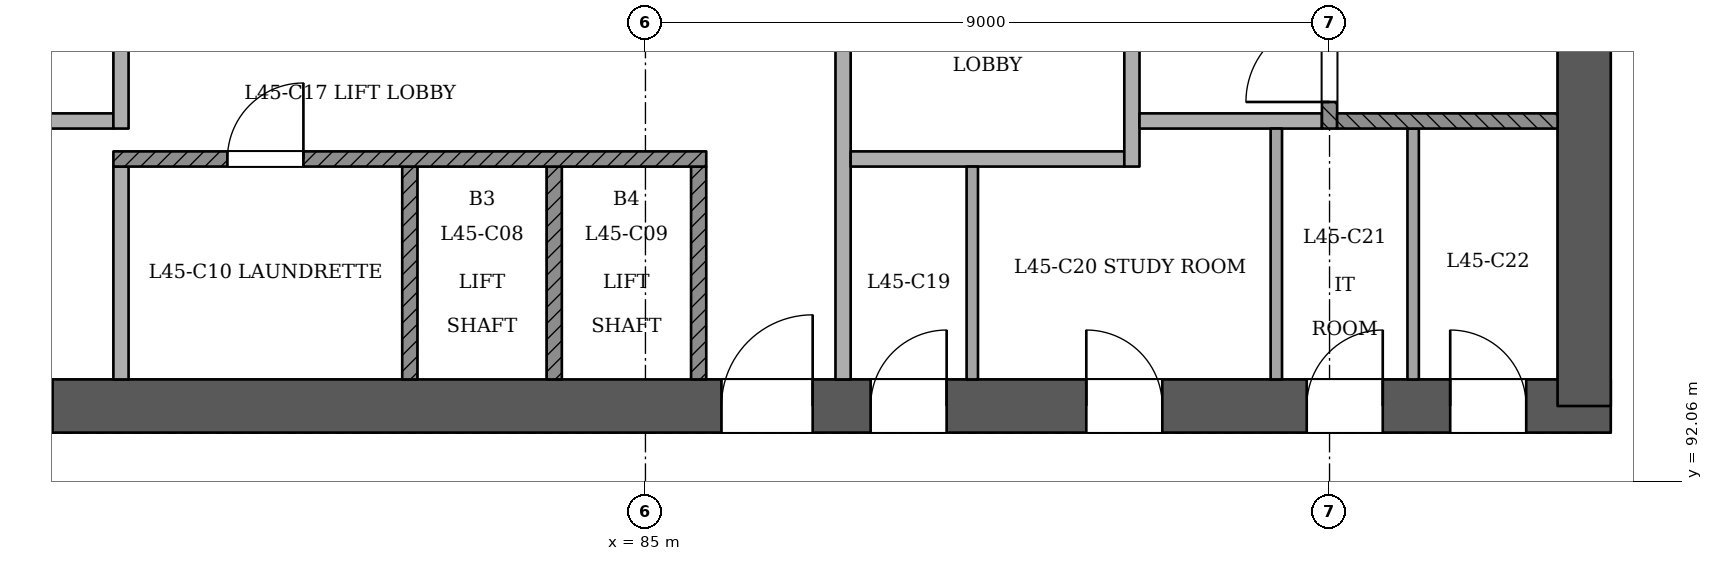
"""IFC4 building model, lengths in metres.
Left out: names, types, materials, properties, quantities, classifications, styles, units other than length and angle.
Written with IfcOpenShell. Run it as: python <this file> out.ifc"""

import sys

from ifc_helpers import new_model, si_unit, direction, frame, frame_2d, origin, place, context, subcontext, project, spatial, rectangle, extrude, element, fill, save


model = new_model("IFC4")
c1 = context("Model", 3, precision=1e-05, world=origin(), true_north=direction((0.0, 1.0)))
c2 = subcontext(c1, "Body", "Model", "MODEL_VIEW")
j1 = project(units=[si_unit("LENGTHUNIT", "METRE"), si_unit("PLANEANGLEUNIT", "RADIAN")], contexts=[c1])
p1 = place(None, origin())
s1 = spatial("IfcSite", under=j1, at=p1, CompositionType="ELEMENT")
p2 = place(p1, origin())
s2 = spatial("IfcBuilding", under=s1, at=p2, CompositionType="ELEMENT")
p3 = place(p2, frame((0.0, 0.0, 174.6)))
s3 = spatial("IfcBuildingStorey", under=s2, at=p3, CompositionType="ELEMENT", Elevation=174.6)
p4 = place(p3, frame((72.65, 93.05, 0.0), z_axis=(0.0, 0.0, 1.0), x_axis=(1.0, 0.0, 0.0)))
e1 = element("IfcWall", 1, at=p4, inside=s3, PredefinedType="SHEAR", context=c2, shape_type="SweptSolid", body=[
    extrude(rectangle(XDim=25.05, YDim=0.7, at=frame_2d((12.525, 0.0))), origin(), (0.0, 0.0, 1.0), 3.6),
])
p5 = place(p4, frame((1.15, 0.0, 0.0)))
e2 = element("IfcOpeningElement", 2, at=p5, cuts=e1, PredefinedType="OPENING", context=c2, shape_type="SweptSolid", body=[
    extrude(rectangle(XDim=1.2, YDim=2.1, at=frame_2d((0.6, 1.05))), frame((0.0, 0.36, 0.0), z_axis=(0.0, -1.0, 0.0), x_axis=(1.0, 0.0, 0.0)), (0.0, 0.0, 1.0), 0.721),
])
p6 = place(p4, frame((3.35, 0.0, 0.0)))
e3 = element("IfcOpeningElement", 3, at=p6, cuts=e1, PredefinedType="OPENING", context=c2, shape_type="SweptSolid", body=[
    extrude(rectangle(XDim=1.2, YDim=2.1, at=frame_2d((0.6, 1.05))), frame((0.0, 0.36, 0.0), z_axis=(0.0, -1.0, 0.0), x_axis=(1.0, 0.0, 0.0)), (0.0, 0.0, 1.0), 0.721),
])
p7 = place(p4, frame((13.35, 0.0, 0.0)))
e4 = element("IfcOpeningElement", 4, at=p7, cuts=e1, PredefinedType="OPENING", context=c2, shape_type="SweptSolid", body=[
    extrude(rectangle(XDim=1.2, YDim=2.1, at=frame_2d((0.6, 1.05))), frame((0.0, 0.36, 0.0), z_axis=(0.0, -1.0, 0.0), x_axis=(1.0, 0.0, 0.0)), (0.0, 0.0, 1.0), 0.721),
])
p8 = place(p4, frame((15.312, 0.0, 0.0)))
e5 = element("IfcOpeningElement", 5, at=p8, cuts=e1, PredefinedType="OPENING", context=c2, shape_type="SweptSolid", body=[
    extrude(rectangle(XDim=1.0, YDim=2.1, at=frame_2d((0.5, 1.05))), frame((0.0, 0.36, 0.0), z_axis=(0.0, -1.0, 0.0), x_axis=(1.0, 0.0, 0.0)), (0.0, 0.0, 1.0), 0.721),
])
p9 = place(p4, frame((18.15, 0.0, 0.0)))
e6 = element("IfcOpeningElement", 6, at=p9, cuts=e1, PredefinedType="OPENING", context=c2, shape_type="SweptSolid", body=[
    extrude(rectangle(XDim=1.0, YDim=2.1, at=frame_2d((0.5, 1.05))), frame((0.0, 0.36, 0.0), z_axis=(0.0, -1.0, 0.0), x_axis=(1.0, 0.0, 0.0)), (0.0, 0.0, 1.0), 0.721),
])
p10 = place(p4, frame((21.05, 0.0, 0.0)))
e7 = element("IfcOpeningElement", 7, at=p10, cuts=e1, PredefinedType="OPENING", context=c2, shape_type="SweptSolid", body=[
    extrude(rectangle(XDim=1.0, YDim=2.1, at=frame_2d((0.5, 1.05))), frame((0.0, 0.36, 0.0), z_axis=(0.0, -1.0, 0.0), x_axis=(1.0, 0.0, 0.0)), (0.0, 0.0, 1.0), 0.721),
])
p11 = place(p4, frame((22.938, 0.0, 0.0)))
e8 = element("IfcOpeningElement", 8, at=p11, cuts=e1, PredefinedType="OPENING", context=c2, shape_type="SweptSolid", body=[
    extrude(rectangle(XDim=1.0, YDim=2.1, at=frame_2d((0.5, 1.05))), frame((0.0, 0.36, 0.0), z_axis=(0.0, -1.0, 0.0), x_axis=(1.0, 0.0, 0.0)), (0.0, 0.0, 1.0), 0.721),
])
p12 = place(p3, frame((97.35, 93.05, 0.0), z_axis=(0.0, 0.0, 1.0), x_axis=(0.0, 1.0, 0.0)))
e9 = element("IfcWall", 9, at=p12, inside=s3, PredefinedType="SHEAR", context=c2, shape_type="SweptSolid", body=[
    extrude(rectangle(XDim=11.05, YDim=0.7, at=frame_2d((5.525, 0.0))), origin(), (0.0, 0.0, 1.0), 3.6),
])
p13 = place(p3, frame((78.1, 93.4, 0.0), z_axis=(0.0, 0.0, 1.0), x_axis=(0.0, 1.0, 0.0)))
e10 = element("IfcWall", 10, at=p13, inside=s3, PredefinedType="PARTITIONING", context=c2, shape_type="SweptSolid", body=[
    extrude(rectangle(XDim=2.8, YDim=0.2, at=frame_2d((1.4, 0.0))), origin(), (0.0, 0.0, 1.0), 3.15),
])
for number, where, z_axis, x_axis in (
    (11, (81.9, 93.4, 0.0), (0.0, 0.0, 1.0), (0.0, 1.0, 0.0)),
    (12, (83.8, 93.4, 0.0), (0.0, 0.0, 1.0), (0.0, 1.0, 0.0)),
    (13, (85.7, 93.4, 0.0), (0.0, 0.0, 1.0), (0.0, 1.0, 0.0)),
):
    element("IfcWall", number, at=place(p3, frame(where, z_axis=z_axis, x_axis=x_axis)), inside=s3, PredefinedType="SOLIDWALL", context=c2, shape_type="SweptSolid", body=[
        extrude(rectangle(XDim=2.8, YDim=0.2, at=frame_2d((1.4, 0.0))), origin(), (0.0, 0.0, 1.0), 3.15),
    ])
p14 = place(p3, frame((87.6, 93.4, 0.0), z_axis=(0.0, 0.0, 1.0), x_axis=(0.0, 1.0, 0.0)))
e14 = element("IfcWall", 14, at=p14, inside=s3, PredefinedType="PARTITIONING", context=c2, shape_type="SweptSolid", body=[
    extrude(rectangle(XDim=7.0, YDim=0.2, at=frame_2d((3.5, 0.0))), origin(), (0.0, 0.0, 1.0), 3.15),
])
p15 = place(p14, frame((4.45, 0.0, 0.0)))
e15 = element("IfcOpeningElement", 15, at=p15, cuts=e14, PredefinedType="OPENING", context=c2, shape_type="SweptSolid", body=[
    extrude(rectangle(XDim=1.1, YDim=2.1, at=frame_2d((0.55, 1.05))), frame((0.0, 0.11, 0.0), z_axis=(0.0, -1.0, 0.0), x_axis=(1.0, 0.0, 0.0)), (0.0, 0.0, 1.0), 0.221),
])
p16 = place(p3, frame((89.3, 93.4, 0.0), z_axis=(0.0, 0.0, 1.0), x_axis=(0.0, 1.0, 0.0)))
e16 = element("IfcWall", 16, at=p16, inside=s3, PredefinedType="PARTITIONING", context=c2, shape_type="SweptSolid", body=[
    extrude(rectangle(XDim=2.8, YDim=0.15, at=frame_2d((1.4, 0.0))), origin(), (0.0, 0.0, 1.0), 3.15),
])
for number, where, z_axis, x_axis in (
    (17, (93.3, 93.4, 0.0), (0.0, 0.0, 1.0), (0.0, 1.0, 0.0)),
    (18, (95.1, 93.4, 0.0), (0.0, 0.0, 1.0), (0.0, 1.0, 0.0)),
):
    element("IfcWall", number, at=place(p3, frame(where, z_axis=z_axis, x_axis=x_axis)), inside=s3, PredefinedType="PARTITIONING", context=c2, shape_type="SweptSolid", body=[
        extrude(rectangle(XDim=3.3, YDim=0.15, at=frame_2d((1.65, 0.0))), origin(), (0.0, 0.0, 1.0), 3.15),
    ])
p17 = place(p3, frame((78.0, 96.3, 0.0), z_axis=(0.0, 0.0, 1.0), x_axis=(1.0, 0.0, 0.0)))
e19 = element("IfcWall", 19, at=p17, inside=s3, PredefinedType="SOLIDWALL", context=c2, shape_type="SweptSolid", body=[
    extrude(rectangle(XDim=7.8, YDim=0.2, at=frame_2d((3.9, 0.0))), origin(), (0.0, 0.0, 1.0), 3.15),
])
p18 = place(p17, frame((1.5, 0.0, 0.0)))
e20 = element("IfcOpeningElement", 20, at=p18, cuts=e19, PredefinedType="OPENING", context=c2, shape_type="SweptSolid", body=[
    extrude(rectangle(XDim=1.0, YDim=2.1, at=frame_2d((0.5, 1.05))), frame((0.0, 0.11, 0.0), z_axis=(0.0, -1.0, 0.0), x_axis=(1.0, 0.0, 0.0)), (0.0, 0.0, 1.0), 0.221),
])
p19 = place(p3, frame((87.7, 96.3, 0.0), z_axis=(0.0, 0.0, 1.0), x_axis=(1.0, 0.0, 0.0)))
e21 = element("IfcWall", 21, at=p19, inside=s3, PredefinedType="PARTITIONING", context=c2, shape_type="SweptSolid", body=[
    extrude(rectangle(XDim=3.6, YDim=0.2, at=frame_2d((1.8, 0.0))), origin(), (0.0, 0.0, 1.0), 3.15),
])
p20 = place(p3, frame((91.4, 96.2, 0.0), z_axis=(0.0, 0.0, 1.0), x_axis=(0.0, 1.0, 0.0)))
e22 = element("IfcWall", 22, at=p20, inside=s3, PredefinedType="PARTITIONING", context=c2, shape_type="SweptSolid", body=[
    extrude(rectangle(XDim=4.2, YDim=0.2, at=frame_2d((2.1, 0.0))), origin(), (0.0, 0.0, 1.0), 3.15),
])
p21 = place(p20, frame((2.45, 0.0, 0.0)))
e23 = element("IfcOpeningElement", 23, at=p21, cuts=e22, PredefinedType="OPENING", context=c2, shape_type="SweptSolid", body=[
    extrude(rectangle(XDim=1.1, YDim=2.1, at=frame_2d((0.55, 1.05))), frame((0.0, 0.11, 0.0), z_axis=(0.0, -1.0, 0.0), x_axis=(1.0, 0.0, 0.0)), (0.0, 0.0, 1.0), 0.221),
])
p22 = place(p3, frame((76.1, 96.8, 0.0), z_axis=(0.0, 0.0, 1.0), x_axis=(1.0, 0.0, 0.0)))
e24 = element("IfcWall", 24, at=p22, inside=s3, PredefinedType="PARTITIONING", context=c2, shape_type="SweptSolid", body=[
    extrude(rectangle(XDim=1.9, YDim=0.2, at=frame_2d((0.95, 0.0))), origin(), (0.0, 0.0, 1.0), 3.15),
])
p23 = place(p3, frame((78.1, 96.7, 0.0), z_axis=(0.0, 0.0, 1.0), x_axis=(0.0, 1.0, 0.0)))
e25 = element("IfcWall", 25, at=p23, inside=s3, PredefinedType="PARTITIONING", context=c2, shape_type="SweptSolid", body=[
    extrude(rectangle(XDim=3.7, YDim=0.2, at=frame_2d((1.85, 0.0))), origin(), (0.0, 0.0, 1.0), 3.15),
])
p24 = place(p23, frame((1.95, 0.0, 0.0)))
e26 = element("IfcOpeningElement", 26, at=p24, cuts=e25, PredefinedType="OPENING", context=c2, shape_type="SweptSolid", body=[
    extrude(rectangle(XDim=1.1, YDim=2.1, at=frame_2d((0.55, 1.05))), frame((0.0, 0.11, 0.0), z_axis=(0.0, -1.0, 0.0), x_axis=(1.0, 0.0, 0.0)), (0.0, 0.0, 1.0), 0.221),
])
p25 = place(p3, frame((91.5, 96.8, 0.0), z_axis=(0.0, 0.0, 1.0), x_axis=(1.0, 0.0, 0.0)))
e27 = element("IfcWall", 27, at=p25, inside=s3, PredefinedType="PARTITIONING", context=c2, shape_type="SweptSolid", body=[
    extrude(rectangle(XDim=2.4, YDim=0.2, at=frame_2d((1.2, 0.0))), origin(), (0.0, 0.0, 1.0), 3.15),
])
p26 = place(p3, frame((94.0, 96.7, 0.0), z_axis=(0.0, 0.0, 1.0), x_axis=(0.0, 1.0, 0.0)))
e28 = element("IfcWall", 28, at=p26, inside=s3, PredefinedType="SOLIDWALL", context=c2, shape_type="SweptSolid", body=[
    extrude(rectangle(XDim=3.7, YDim=0.2, at=frame_2d((1.85, 0.0))), origin(), (0.0, 0.0, 1.0), 3.15),
])
p27 = place(p26, frame((0.35, 0.0, 0.0)))
e29 = element("IfcOpeningElement", 29, at=p27, cuts=e28, PredefinedType="OPENING", context=c2, shape_type="SweptSolid", body=[
    extrude(rectangle(XDim=1.1, YDim=2.1, at=frame_2d((0.55, 1.05))), frame((0.0, 0.11, 0.0), z_axis=(0.0, -1.0, 0.0), x_axis=(1.0, 0.0, 0.0)), (0.0, 0.0, 1.0), 0.221),
])
p28 = place(p3, frame((94.1, 96.8, 0.0), z_axis=(0.0, 0.0, 1.0), x_axis=(1.0, 0.0, 0.0)))
e30 = element("IfcWall", 30, at=p28, inside=s3, PredefinedType="SOLIDWALL", context=c2, shape_type="SweptSolid", body=[
    extrude(rectangle(XDim=2.9, YDim=0.2, at=frame_2d((1.45, 0.0))), origin(), (0.0, 0.0, 1.0), 3.15),
])
p29 = place(p27, origin())
e31 = element("IfcDoor", 31, at=p29, inside=s3, OperationType="SINGLE_SWING_LEFT", PredefinedType="NOTDEFINED", context=c2, shape_type="SweptSolid", body=[
    extrude(rectangle(XDim=1.1, YDim=2.1, at=frame_2d((0.55, 1.05))), frame((0.0, 0.025, 0.0), z_axis=(0.0, -1.0, 0.0), x_axis=(1.0, 0.0, 0.0)), (0.0, 0.0, 1.0), 0.05),
])
fill(e29, e31)
p30 = place(p6, origin())
e32 = element("IfcDoor", 32, at=p30, inside=s3, OperationType="SINGLE_SWING_LEFT", PredefinedType="NOTDEFINED", context=c2, shape_type="SweptSolid", body=[
    extrude(rectangle(XDim=1.2, YDim=2.1, at=frame_2d((0.6, 1.05))), frame((0.0, 0.025, 0.0), z_axis=(0.0, -1.0, 0.0), x_axis=(1.0, 0.0, 0.0)), (0.0, 0.0, 1.0), 0.05),
])
fill(e3, e32)
p31 = place(p7, origin())
e33 = element("IfcDoor", 33, at=p31, inside=s3, OperationType="SINGLE_SWING_RIGHT", PredefinedType="NOTDEFINED", context=c2, shape_type="SweptSolid", body=[
    extrude(rectangle(XDim=1.2, YDim=2.1, at=frame_2d((0.6, 1.05))), frame((0.0, 0.025, 0.0), z_axis=(0.0, -1.0, 0.0), x_axis=(1.0, 0.0, 0.0)), (0.0, 0.0, 1.0), 0.05),
])
fill(e4, e33)
p32 = place(p8, origin())
e34 = element("IfcDoor", 34, at=p32, inside=s3, OperationType="SINGLE_SWING_RIGHT", PredefinedType="NOTDEFINED", context=c2, shape_type="SweptSolid", body=[
    extrude(rectangle(XDim=1.0, YDim=2.1, at=frame_2d((0.5, 1.05))), frame((0.0, 0.025, 0.0), z_axis=(0.0, -1.0, 0.0), x_axis=(1.0, 0.0, 0.0)), (0.0, 0.0, 1.0), 0.05),
])
fill(e5, e34)
p33 = place(p9, origin())
e35 = element("IfcDoor", 35, at=p33, inside=s3, OperationType="SINGLE_SWING_LEFT", PredefinedType="NOTDEFINED", context=c2, shape_type="SweptSolid", body=[
    extrude(rectangle(XDim=1.0, YDim=2.1, at=frame_2d((0.5, 1.05))), frame((0.0, 0.025, 0.0), z_axis=(0.0, -1.0, 0.0), x_axis=(1.0, 0.0, 0.0)), (0.0, 0.0, 1.0), 0.05),
])
fill(e6, e35)
p34 = place(p10, origin())
e36 = element("IfcDoor", 36, at=p34, inside=s3, OperationType="SINGLE_SWING_RIGHT", PredefinedType="NOTDEFINED", context=c2, shape_type="SweptSolid", body=[
    extrude(rectangle(XDim=1.0, YDim=2.1, at=frame_2d((0.5, 1.05))), frame((0.0, 0.025, 0.0), z_axis=(0.0, -1.0, 0.0), x_axis=(1.0, 0.0, 0.0)), (0.0, 0.0, 1.0), 0.05),
])
fill(e7, e36)
p35 = place(p11, origin())
e37 = element("IfcDoor", 37, at=p35, inside=s3, OperationType="SINGLE_SWING_LEFT", PredefinedType="NOTDEFINED", context=c2, shape_type="SweptSolid", body=[
    extrude(rectangle(XDim=1.0, YDim=2.1, at=frame_2d((0.5, 1.05))), frame((0.0, 0.025, 0.0), z_axis=(0.0, -1.0, 0.0), x_axis=(1.0, 0.0, 0.0)), (0.0, 0.0, 1.0), 0.05),
])
fill(e8, e37)
p36 = place(p18, origin())
e38 = element("IfcDoor", 38, at=p36, inside=s3, OperationType="SINGLE_SWING_RIGHT", PredefinedType="NOTDEFINED", context=c2, shape_type="SweptSolid", body=[
    extrude(rectangle(XDim=1.0, YDim=2.1, at=frame_2d((0.5, 1.05))), frame((0.0, 0.025, 0.0), z_axis=(0.0, -1.0, 0.0), x_axis=(1.0, 0.0, 0.0)), (0.0, 0.0, 1.0), 0.05),
])
fill(e20, e38)
save(model, sys.argv[1])
